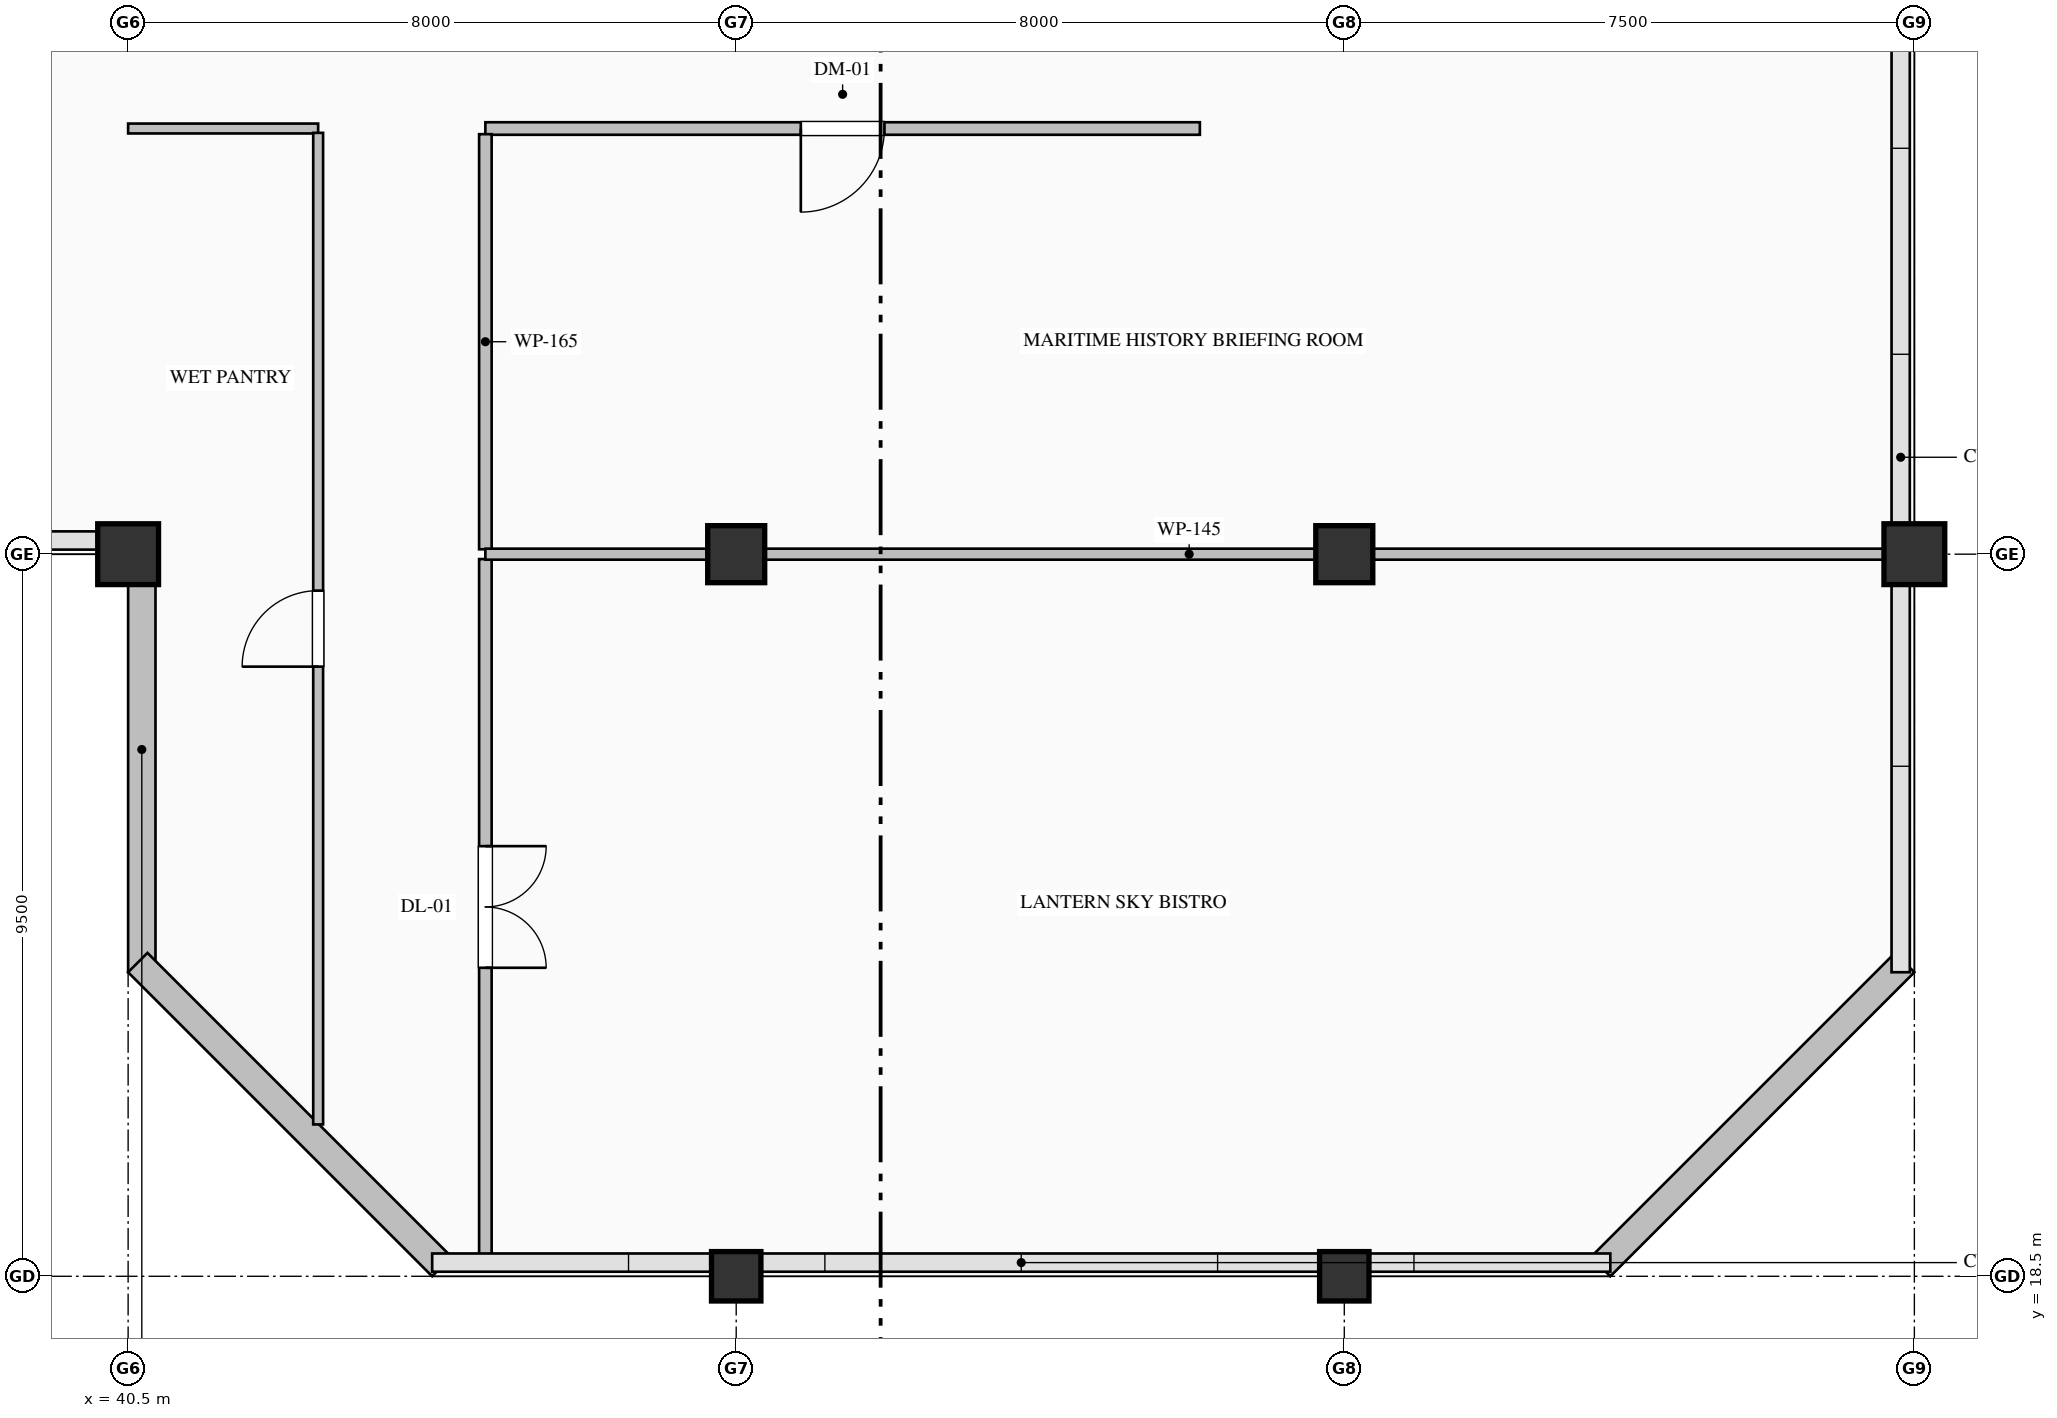
"""IFC4 building model, lengths in metres.
Left out: names, types, materials, properties, quantities, classifications, styles, units other than length and angle.
Written with IfcOpenShell. Run it as: python <this file> out.ifc"""

import sys

from ifc_helpers import new_model, si_unit, direction, frame, frame_2d, origin, origin_2d, place, context, subcontext, project, spatial, rectangle, hollow_rectangle, extrude, element, fill, save


model = new_model("IFC4")
c1 = context("Model", 3, precision=1e-05, world=origin(), true_north=direction((0.0, 1.0)))
c2 = subcontext(c1, "Body", "Model", "MODEL_VIEW")
j1 = project(units=[si_unit("LENGTHUNIT", "METRE"), si_unit("PLANEANGLEUNIT", "RADIAN")], contexts=[c1])
p1 = place(None, origin())
s1 = spatial("IfcSite", under=j1, at=p1, CompositionType="ELEMENT")
p2 = place(p1, origin())
s2 = spatial("IfcBuilding", under=s1, at=p2, CompositionType="ELEMENT")
p3 = place(p2, frame((0.0, 0.0, 373.0)))
s3 = spatial("IfcBuildingStorey", under=s2, at=p3, CompositionType="ELEMENT", Elevation=373.0)
p4 = place(p3, frame((40.5, 28.0, 0.0), z_axis=(0.0, 0.0, 1.0), x_axis=(1.0, 0.0, 0.0)))
e1 = element("IfcColumn", 1, at=p4, inside=s3, PredefinedType="COLUMN", context=c2, shape_type="SweptSolid", body=[
    extrude(hollow_rectangle(XDim=0.8, YDim=0.8, WallThickness=0.032, at=origin_2d()), origin(), (0.0, 0.0, 1.0), 5.4),
])
p5 = place(p3, frame((48.5, 18.5, 0.0), z_axis=(0.0, 0.0, 1.0), x_axis=(1.0, 0.0, 0.0)))
e2 = element("IfcColumn", 2, at=p5, inside=s3, PredefinedType="COLUMN", context=c2, shape_type="SweptSolid", body=[
    extrude(hollow_rectangle(XDim=0.65, YDim=0.65, WallThickness=0.028, at=origin_2d()), origin(), (0.0, 0.0, 1.0), 5.4),
])
p6 = place(p3, frame((48.5, 28.0, 0.0), z_axis=(0.0, 0.0, 1.0), x_axis=(1.0, 0.0, 0.0)))
e3 = element("IfcColumn", 3, at=p6, inside=s3, PredefinedType="COLUMN", context=c2, shape_type="SweptSolid", body=[
    extrude(rectangle(XDim=0.75, YDim=0.75, at=origin_2d()), origin(), (0.0, 0.0, 1.0), 5.4),
])
p7 = place(p3, frame((56.5, 18.5, 0.0), z_axis=(0.0, 0.0, 1.0), x_axis=(1.0, 0.0, 0.0)))
e4 = element("IfcColumn", 4, at=p7, inside=s3, PredefinedType="COLUMN", context=c2, shape_type="SweptSolid", body=[
    extrude(hollow_rectangle(XDim=0.65, YDim=0.65, WallThickness=0.028, at=origin_2d()), origin(), (0.0, 0.0, 1.0), 5.4),
])
p8 = place(p3, frame((56.5, 28.0, 0.0), z_axis=(0.0, 0.0, 1.0), x_axis=(1.0, 0.0, 0.0)))
e5 = element("IfcColumn", 5, at=p8, inside=s3, PredefinedType="COLUMN", context=c2, shape_type="SweptSolid", body=[
    extrude(rectangle(XDim=0.75, YDim=0.75, at=origin_2d()), origin(), (0.0, 0.0, 1.0), 5.4),
])
p9 = place(p3, frame((64.0, 28.0, 0.0), z_axis=(0.0, 0.0, 1.0), x_axis=(1.0, 0.0, 0.0)))
e6 = element("IfcColumn", 6, at=p9, inside=s3, PredefinedType="COLUMN", context=c2, shape_type="SweptSolid", body=[
    extrude(hollow_rectangle(XDim=0.8, YDim=0.8, WallThickness=0.032, at=origin_2d()), origin(), (0.0, 0.0, 1.0), 5.4),
])
p10 = place(p3, frame((40.68, 22.5, 0.0), z_axis=(0.0, 0.0, 1.0), x_axis=(0.0, 1.0, 0.0)))
e7 = element("IfcWall", 7, at=p10, inside=s3, PredefinedType="SOLIDWALL", context=c2, shape_type="SweptSolid", body=[
    extrude(rectangle(XDim=5.86, YDim=0.36, at=frame_2d((2.93, 0.0))), origin(), (0.0, 0.0, 1.0), 4.51),
])
for number, where, z_axis, x_axis in (
    (8, (63.873, 22.627, 0.0), (0.0, 0.0, 1.0), (-0.707, -0.707, 0.0)),
    (9, (44.627, 18.627, 0.0), (0.0, 0.0, 1.0), (-0.707, 0.707, 0.0)),
):
    element("IfcWall", number, at=place(p3, frame(where, z_axis=z_axis, x_axis=x_axis)), inside=s3, PredefinedType="SOLIDWALL", context=c2, shape_type="SweptSolid", body=[
        extrude(rectangle(XDim=5.657, YDim=0.36, at=frame_2d((2.828, 0.0))), origin(), (0.0, 0.0, 1.0), 5.11),
    ])
p11 = place(p3, frame((54.6, 33.6, 0.0), z_axis=(0.0, 0.0, 1.0), x_axis=(-1.0, 0.0, 0.0)))
e10 = element("IfcWall", 10, at=p11, inside=s3, PredefinedType="PARTITIONING", context=c2, shape_type="SweptSolid", body=[
    extrude(rectangle(XDim=9.4, YDim=0.165, at=frame_2d((4.7, 0.0))), origin(), (0.0, 0.0, 1.0), 5.11),
])
p12 = place(p11, frame((4.15, 0.0, 0.0)))
e11 = element("IfcOpeningElement", 11, at=p12, cuts=e10, PredefinedType="OPENING", context=c2, shape_type="SweptSolid", body=[
    extrude(rectangle(XDim=1.1, YDim=2.2, at=frame_2d((0.55, 1.1))), frame((0.0, 0.093, 0.0), z_axis=(0.0, -1.0, 0.0), x_axis=(1.0, 0.0, 0.0)), (0.0, 0.0, 1.0), 0.185),
])
p13 = place(p3, frame((43.0, 33.6, 0.0), z_axis=(0.0, 0.0, 1.0), x_axis=(-1.0, 0.0, 0.0)))
e12 = element("IfcWall", 12, at=p13, inside=s3, PredefinedType="PARTITIONING", context=c2, shape_type="SweptSolid", body=[
    extrude(rectangle(XDim=2.5, YDim=0.13, at=frame_2d((1.25, 0.0))), origin(), (0.0, 0.0, 1.0), 5.11),
])
p14 = place(p3, frame((45.2, 27.936, 0.0), z_axis=(0.0, 0.0, 1.0), x_axis=(0.0, -1.0, 0.0)))
e13 = element("IfcWall", 13, at=p14, inside=s3, PredefinedType="PARTITIONING", context=c2, shape_type="SweptSolid", body=[
    extrude(rectangle(XDim=9.154, YDim=0.165, at=frame_2d((4.577, 0.0))), origin(), (0.0, 0.0, 1.0), 5.11),
])
p15 = place(p14, frame((3.777, 0.0, 0.0)))
e14 = element("IfcOpeningElement", 14, at=p15, cuts=e13, PredefinedType="OPENING", context=c2, shape_type="SweptSolid", body=[
    extrude(rectangle(XDim=1.6, YDim=2.25, at=frame_2d((0.8, 1.125))), frame((0.0, 0.093, 0.0), z_axis=(0.0, -1.0, 0.0), x_axis=(1.0, 0.0, 0.0)), (0.0, 0.0, 1.0), 0.185),
])
p16 = place(p3, frame((45.2, 33.525, 0.0), z_axis=(0.0, 0.0, 1.0), x_axis=(0.0, -1.0, 0.0)))
e15 = element("IfcWall", 15, at=p16, inside=s3, PredefinedType="PARTITIONING", context=c2, shape_type="SweptSolid", body=[
    extrude(rectangle(XDim=5.461, YDim=0.165, at=frame_2d((2.73, 0.0))), origin(), (0.0, 0.0, 1.0), 5.11),
])
p17 = place(p3, frame((43.0, 20.498, 0.0), z_axis=(0.0, 0.0, 1.0), x_axis=(0.0, 1.0, 0.0)))
e16 = element("IfcWall", 16, at=p17, inside=s3, PredefinedType="PARTITIONING", context=c2, shape_type="SweptSolid", body=[
    extrude(rectangle(XDim=13.045, YDim=0.13, at=frame_2d((6.522, 0.0))), origin(), (0.0, 0.0, 1.0), 5.11),
])
p18 = place(p17, frame((6.023, 0.0, 0.0)))
e17 = element("IfcOpeningElement", 17, at=p18, cuts=e16, PredefinedType="OPENING", context=c2, shape_type="SweptSolid", body=[
    extrude(rectangle(XDim=1.0, YDim=2.15, at=frame_2d((0.5, 1.075))), frame((0.0, 0.075, 0.0), z_axis=(0.0, -1.0, 0.0), x_axis=(1.0, 0.0, 0.0)), (0.0, 0.0, 1.0), 0.15),
])
p19 = place(p3, frame((45.2, 28.0, 0.0), z_axis=(0.0, 0.0, 1.0), x_axis=(1.0, 0.0, 0.0)))
e18 = element("IfcWall", 18, at=p19, inside=s3, PredefinedType="PARTITIONING", context=c2, shape_type="SweptSolid", body=[
    extrude(rectangle(XDim=18.518, YDim=0.145, at=frame_2d((9.259, 0.0))), origin(), (0.0, 0.0, 1.0), 4.502),
])
p20 = place(p15, origin())
e19 = element("IfcDoor", 19, at=p20, inside=s3, OperationType="DOUBLE_DOOR_SINGLE_SWING", PredefinedType="DOOR", context=c2, shape_type="SweptSolid", body=[
    extrude(rectangle(XDim=1.6, YDim=2.25, at=frame_2d((0.8, 1.125))), frame((0.0, 0.025, 0.0), z_axis=(0.0, -1.0, 0.0), x_axis=(1.0, 0.0, 0.0)), (0.0, 0.0, 1.0), 0.05),
])
fill(e14, e19)
p21 = place(p12, origin())
e20 = element("IfcDoor", 20, at=p21, inside=s3, OperationType="SINGLE_SWING_RIGHT", PredefinedType="DOOR", context=c2, shape_type="SweptSolid", body=[
    extrude(rectangle(XDim=1.1, YDim=2.2, at=frame_2d((0.55, 1.1))), frame((0.0, 0.025, 0.0), z_axis=(0.0, -1.0, 0.0), x_axis=(1.0, 0.0, 0.0)), (0.0, 0.0, 1.0), 0.05),
])
fill(e11, e20)
p22 = place(p18, origin())
e21 = element("IfcDoor", 21, at=p22, inside=s3, OperationType="SINGLE_SWING_LEFT", PredefinedType="DOOR", context=c2, shape_type="SweptSolid", body=[
    extrude(rectangle(XDim=1.0, YDim=2.15, at=frame_2d((0.5, 1.075))), frame((0.0, 0.025, 0.0), z_axis=(0.0, -1.0, 0.0), x_axis=(1.0, 0.0, 0.0)), (0.0, 0.0, 1.0), 0.05),
])
fill(e17, e21)
save(model, sys.argv[1])
